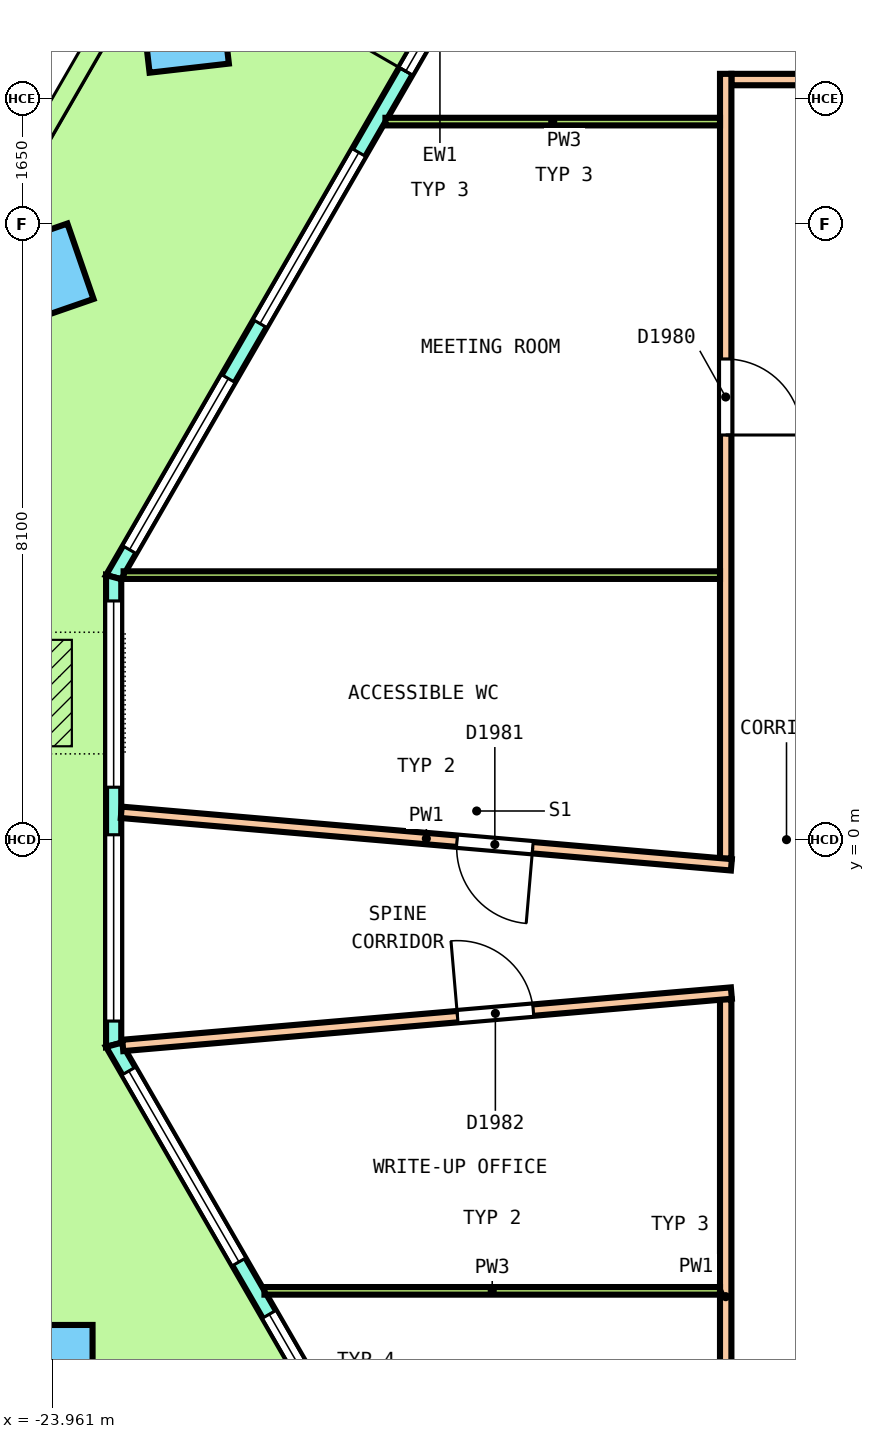
"""IFC4 building model, lengths in metres.
Left out: names, types, materials, properties, quantities, classifications, styles, units other than length and angle.
Written with IfcOpenShell. Run it as: python <this file> out.ifc"""

import sys

from ifc_helpers import new_model, si_unit, direction, frame, frame_2d, origin, origin_2d, place, context, subcontext, project, spatial, polyline, rectangle, outline, extrude, element, fill, save


model = new_model("IFC4")
c1 = context("Model", 3, precision=1e-05, world=origin(), true_north=direction((0.0, 1.0)))
c2 = subcontext(c1, "Body", "Model", "MODEL_VIEW")
j1 = project(units=[si_unit("LENGTHUNIT", "METRE"), si_unit("PLANEANGLEUNIT", "RADIAN")], contexts=[c1])
p1 = place(None, origin())
s1 = spatial("IfcSite", under=j1, at=p1, CompositionType="ELEMENT")
p2 = place(p1, origin())
s2 = spatial("IfcBuilding", under=s1, at=p2, CompositionType="ELEMENT")
p3 = place(p2, frame((0.0, 0.0, 223.4)))
s3 = spatial("IfcBuildingStorey", under=s2, at=p3, CompositionType="ELEMENT", Elevation=223.4)
p4 = place(p3, frame((-22.218, 10.672, 0.0), z_axis=(-0.025403639223, 0.018852174371, 0.999499500068), x_axis=(-0.500491739031, -0.865733791755, 0.003608458862)))
e1 = element("IfcColumn", 1, at=p4, inside=s3, PredefinedType="COLUMN", context=c2, shape_type="SweptSolid", body=[
    extrude(rectangle(XDim=1.05, YDim=1.05, at=origin_2d()), origin(), (0.0, 0.0, 1.0), 3.652),
])
p5 = place(p3, frame((-24.085, 7.438, 0.0), z_axis=(-0.021792492936, 0.025134899828, 0.999446508855), x_axis=(-0.499665392548, -0.866150076023, 0.010887667087)))
e2 = element("IfcColumn", 2, at=p5, inside=s3, PredefinedType="COLUMN", context=c2, shape_type="SweptSolid", body=[
    extrude(rectangle(XDim=1.05, YDim=1.05, at=origin_2d()), origin(), (0.0, 0.0, 1.0), 3.652),
])
p6 = place(p3, frame((-23.954, -6.91, 0.0), z_axis=(-0.010899680715, 0.018923985535, 0.999761511427), x_axis=(0.499758931252, -0.865889190801, 0.021838495538)))
e3 = element("IfcColumn", 3, at=p6, inside=s3, PredefinedType="COLUMN", context=c2, shape_type="SweptSolid", body=[
    extrude(rectangle(XDim=1.05, YDim=1.05, at=origin_2d()), origin(), (0.0, 0.0, 1.0), 3.651),
])
p7 = place(p3, frame((-14.567, 18.323, 0.0), z_axis=(0.0, 0.0, 1.0), x_axis=(-0.5000034888, -0.866023389516, 0.0)))
e4 = element("IfcWall", 4, at=p7, inside=s3, PredefinedType="SOLIDWALL", context=c2, shape_type="SweptSolid", body=[
    extrude(outline(polyline([(-0.027, -0.1), (0.986, -0.1), (2.0, -0.1), (3.013, -0.1), (4.026, -0.1), (5.039, -0.1), (6.052, -0.1), (7.065, -0.1), (8.079, -0.1), (9.092, -0.1), (10.105, -0.1), (11.118, -0.1), (12.131, -0.1), (13.145, -0.1), (14.158, -0.1), (15.171, -0.1), (16.184, -0.1), (17.197, -0.1), (17.144, 0.1), (16.137, 0.1), (15.13, 0.1), (14.123, 0.1), (13.116, 0.1), (12.109, 0.1), (11.102, 0.1), (10.095, 0.1), (9.089, 0.1), (8.082, 0.1), (7.075, 0.1), (6.068, 0.1), (5.061, 0.1), (4.054, 0.1), (3.047, 0.1), (2.041, 0.1), (1.034, 0.1), (0.027, 0.1), (-0.027, -0.1)])), origin(), (0.0, 0.0, 1.0), 3.7),
])
p8 = place(p7, frame((0.417, 0.0, 0.1)))
e5 = element("IfcOpeningElement", 5, at=p8, cuts=e4, PredefinedType="OPENING", context=c2, shape_type="SweptSolid", body=[
    extrude(rectangle(XDim=2.6, YDim=2.65, at=frame_2d((1.3, 1.325))), frame((0.0, 0.11, 0.0), z_axis=(0.0, -1.0, 0.0), x_axis=(1.0, 0.0, 0.0)), (0.0, 0.0, 1.0), 0.22),
])
p9 = place(p7, frame((3.851, 0.0, 0.1)))
e6 = element("IfcOpeningElement", 6, at=p9, cuts=e4, PredefinedType="OPENING", context=c2, shape_type="SweptSolid", body=[
    extrude(rectangle(XDim=2.6, YDim=2.65, at=frame_2d((1.3, 1.325))), frame((0.0, 0.11, 0.0), z_axis=(0.0, -1.0, 0.0), x_axis=(1.0, 0.0, 0.0)), (0.0, 0.0, 1.0), 0.22),
])
p10 = place(p7, frame((7.685, 0.0, 0.0)))
e7 = element("IfcOpeningElement", 7, at=p10, cuts=e4, PredefinedType="OPENING", context=c2, shape_type="SweptSolid", body=[
    extrude(rectangle(XDim=1.8, YDim=2.4, at=frame_2d((0.9, 1.2))), frame((0.0, 0.11, 0.0), z_axis=(0.0, -1.0, 0.0), x_axis=(1.0, 0.0, 0.0)), (0.0, 0.0, 1.0), 0.22),
])
p11 = place(p7, frame((7.685, 0.0, 2.55)))
e8 = element("IfcOpeningElement", 8, at=p11, cuts=e4, PredefinedType="OPENING", context=c2, shape_type="SweptSolid", body=[
    extrude(rectangle(XDim=1.8, YDim=0.2, at=frame_2d((0.9, 0.1))), frame((0.0, 0.11, 0.0), z_axis=(0.0, -1.0, 0.0), x_axis=(1.0, 0.0, 0.0)), (0.0, 0.0, 1.0), 0.22),
])
p12 = place(p7, frame((10.719, 0.0, 0.1)))
e9 = element("IfcOpeningElement", 9, at=p12, cuts=e4, PredefinedType="OPENING", context=c2, shape_type="SweptSolid", body=[
    extrude(rectangle(XDim=2.6, YDim=2.65, at=frame_2d((1.3, 1.325))), frame((0.0, 0.11, 0.0), z_axis=(0.0, -1.0, 0.0), x_axis=(1.0, 0.0, 0.0)), (0.0, 0.0, 1.0), 0.22),
])
p13 = place(p7, frame((14.153, 0.0, 0.1)))
e10 = element("IfcOpeningElement", 10, at=p13, cuts=e4, PredefinedType="OPENING", context=c2, shape_type="SweptSolid", body=[
    extrude(rectangle(XDim=2.6, YDim=2.65, at=frame_2d((1.3, 1.325))), frame((0.0, 0.11, 0.0), z_axis=(0.0, -1.0, 0.0), x_axis=(1.0, 0.0, 0.0)), (0.0, 0.0, 1.0), 0.22),
])
p14 = place(p3, frame((-23.152, 3.454, 0.0), z_axis=(0.0, 0.0, 1.0), x_axis=(0.0, -1.0, 0.0)))
e11 = element("IfcWall", 11, at=p14, inside=s3, PredefinedType="SOLIDWALL", context=c2, shape_type="SweptSolid", body=[
    extrude(outline(polyline([(-0.027, -0.1), (1.008, -0.1), (2.042, -0.1), (3.076, -0.1), (4.111, -0.1), (5.145, -0.1), (6.18, -0.1), (6.126, 0.1), (5.109, 0.1), (4.093, 0.1), (3.076, 0.1), (2.06, 0.1), (1.043, 0.1), (0.027, 0.1), (-0.027, -0.1)])), origin(), (0.0, 0.0, 1.0), 3.7),
])
p15 = place(p14, frame((0.313, 0.0, 0.1)))
e12 = element("IfcOpeningElement", 12, at=p15, cuts=e11, PredefinedType="OPENING", context=c2, shape_type="SweptSolid", body=[
    extrude(rectangle(XDim=2.45, YDim=2.65, at=frame_2d((1.225, 1.325))), frame((0.0, 0.11, 0.0), z_axis=(0.0, -1.0, 0.0), x_axis=(1.0, 0.0, 0.0)), (0.0, 0.0, 1.0), 0.22),
])
p16 = place(p14, frame((3.39, 0.0, 0.1)))
e13 = element("IfcOpeningElement", 13, at=p16, cuts=e11, PredefinedType="OPENING", context=c2, shape_type="SweptSolid", body=[
    extrude(rectangle(XDim=2.45, YDim=2.65, at=frame_2d((1.225, 1.325))), frame((0.0, 0.11, 0.0), z_axis=(0.0, -1.0, 0.0), x_axis=(1.0, 0.0, 0.0)), (0.0, 0.0, 1.0), 0.22),
])
p17 = place(p3, frame((-23.152, -2.699, 0.0), z_axis=(0.0, 0.0, 1.0), x_axis=(0.499993148765, -0.866029359311, 0.0)))
e14 = element("IfcWall", 14, at=p17, inside=s3, PredefinedType="SOLIDWALL", context=c2, shape_type="SweptSolid", body=[
    extrude(outline(polyline([(-0.027, -0.1), (1.003, -0.1), (2.032, -0.1), (3.062, -0.1), (4.091, -0.1), (5.121, -0.1), (6.15, -0.1), (7.179, -0.1), (8.209, -0.1), (9.238, -0.1), (10.268, -0.1), (11.297, -0.1), (12.327, -0.1), (13.356, -0.1), (14.386, -0.1), (15.415, -0.1), (16.445, -0.1), (17.474, -0.1), (18.504, -0.1), (18.45, 0.1), (17.427, 0.1), (16.403, 0.1), (15.379, 0.1), (14.356, 0.1), (13.333, 0.1), (12.309, 0.1), (11.285, 0.1), (10.262, 0.1), (9.238, 0.1), (8.215, 0.1), (7.191, 0.1), (6.168, 0.1), (5.144, 0.1), (4.121, 0.1), (3.097, 0.1), (2.074, 0.1), (1.05, 0.1), (0.027, 0.1), (-0.027, -0.1)])), origin(), (0.0, 0.0, 1.0), 3.7),
])
p18 = place(p17, frame((0.398, 0.0, 0.1)))
e15 = element("IfcOpeningElement", 15, at=p18, cuts=e14, PredefinedType="OPENING", context=c2, shape_type="SweptSolid", body=[
    extrude(rectangle(XDim=2.9, YDim=2.65, at=frame_2d((1.45, 1.325))), frame((0.0, 0.11, 0.0), z_axis=(0.0, -1.0, 0.0), x_axis=(1.0, 0.0, 0.0)), (0.0, 0.0, 1.0), 0.22),
])
p19 = place(p17, frame((4.093, 0.0, 0.1)))
e16 = element("IfcOpeningElement", 16, at=p19, cuts=e14, PredefinedType="OPENING", context=c2, shape_type="SweptSolid", body=[
    extrude(rectangle(XDim=2.9, YDim=2.65, at=frame_2d((1.45, 1.325))), frame((0.0, 0.11, 0.0), z_axis=(0.0, -1.0, 0.0), x_axis=(1.0, 0.0, 0.0)), (0.0, 0.0, 1.0), 0.22),
])
p20 = place(p17, frame((8.338, 0.0, 0.0)))
e17 = element("IfcOpeningElement", 17, at=p20, cuts=e14, PredefinedType="OPENING", context=c2, shape_type="SweptSolid", body=[
    extrude(rectangle(XDim=1.8, YDim=2.4, at=frame_2d((0.9, 1.2))), frame((0.0, 0.11, 0.0), z_axis=(0.0, -1.0, 0.0), x_axis=(1.0, 0.0, 0.0)), (0.0, 0.0, 1.0), 0.22),
])
p21 = place(p17, frame((8.338, 0.0, 2.55)))
e18 = element("IfcOpeningElement", 18, at=p21, cuts=e14, PredefinedType="OPENING", context=c2, shape_type="SweptSolid", body=[
    extrude(rectangle(XDim=1.8, YDim=0.2, at=frame_2d((0.9, 0.1))), frame((0.0, 0.11, 0.0), z_axis=(0.0, -1.0, 0.0), x_axis=(1.0, 0.0, 0.0)), (0.0, 0.0, 1.0), 0.22),
])
p22 = place(p17, frame((11.484, 0.0, 0.1)))
e19 = element("IfcOpeningElement", 19, at=p22, cuts=e14, PredefinedType="OPENING", context=c2, shape_type="SweptSolid", body=[
    extrude(rectangle(XDim=2.9, YDim=2.65, at=frame_2d((1.45, 1.325))), frame((0.0, 0.11, 0.0), z_axis=(0.0, -1.0, 0.0), x_axis=(1.0, 0.0, 0.0)), (0.0, 0.0, 1.0), 0.22),
])
p23 = place(p17, frame((15.179, 0.0, 0.1)))
e20 = element("IfcOpeningElement", 20, at=p23, cuts=e14, PredefinedType="OPENING", context=c2, shape_type="SweptSolid", body=[
    extrude(rectangle(XDim=2.9, YDim=2.65, at=frame_2d((1.45, 1.325))), frame((0.0, 0.11, 0.0), z_axis=(0.0, -1.0, 0.0), x_axis=(1.0, 0.0, 0.0)), (0.0, 0.0, 1.0), 0.22),
])
p24 = place(p3, frame((-15.025, 10.0, 0.0), z_axis=(0.0, 0.0, 1.0), x_axis=(1.0, 0.0, 0.0)))
e21 = element("IfcWall", 21, at=p24, inside=s3, PredefinedType="PARTITIONING", context=c2, shape_type="SweptSolid", body=[
    extrude(rectangle(XDim=30.075, YDim=0.15, at=frame_2d((15.038, 0.0))), origin(), (0.0, 0.0, 1.0), 2.8),
])
p25 = place(p24, frame((25.509, 0.0, 0.0)))
e22 = element("IfcOpeningElement", 22, at=p25, cuts=e21, PredefinedType="OPENING", context=c2, shape_type="SweptSolid", body=[
    extrude(rectangle(XDim=1.2, YDim=2.1, at=frame_2d((0.6, 1.05))), frame((0.0, 0.085, 0.0), z_axis=(0.0, -1.0, 0.0), x_axis=(1.0, 0.0, 0.0)), (0.0, 0.0, 1.0), 0.17),
])
p26 = place(p24, frame((14.409, 0.0, 0.0)))
e23 = element("IfcOpeningElement", 23, at=p26, cuts=e21, PredefinedType="OPENING", context=c2, shape_type="SweptSolid", body=[
    extrude(rectangle(XDim=1.0, YDim=2.1, at=frame_2d((0.5, 1.05))), frame((0.0, 0.085, 0.0), z_axis=(0.0, -1.0, 0.0), x_axis=(1.0, 0.0, 0.0)), (0.0, 0.0, 1.0), 0.17),
])
p27 = place(p24, frame((2.949, 0.0, 0.0)))
e24 = element("IfcOpeningElement", 24, at=p27, cuts=e21, PredefinedType="OPENING", context=c2, shape_type="SweptSolid", body=[
    extrude(rectangle(XDim=1.2, YDim=2.1, at=frame_2d((0.6, 1.05))), frame((0.0, 0.085, 0.0), z_axis=(0.0, -1.0, 0.0), x_axis=(1.0, 0.0, 0.0)), (0.0, 0.0, 1.0), 0.17),
])
p28 = place(p3, frame((-15.1, -9.925, 0.0), z_axis=(0.0, 0.0, 1.0), x_axis=(0.0, 1.0, 0.0)))
e25 = element("IfcWall", 25, at=p28, inside=s3, PredefinedType="PARTITIONING", context=c2, shape_type="SweptSolid", body=[
    extrude(rectangle(XDim=7.825, YDim=0.15, at=frame_2d((3.913, 0.0))), origin(), (0.0, 0.0, 1.0), 2.8),
])
p29 = place(p28, frame((0.866, 0.0, 0.0)))
e26 = element("IfcOpeningElement", 26, at=p29, cuts=e25, PredefinedType="OPENING", context=c2, shape_type="SweptSolid", body=[
    extrude(rectangle(XDim=1.0, YDim=2.1, at=frame_2d((0.5, 1.05))), frame((0.0, 0.085, 0.0), z_axis=(0.0, -1.0, 0.0), x_axis=(1.0, 0.0, 0.0)), (0.0, 0.0, 1.0), 0.17),
])
p30 = place(p3, frame((-15.1, -0.25, 0.0), z_axis=(0.0, 0.0, 1.0), x_axis=(0.0, 1.0, 0.0)))
e27 = element("IfcWall", 27, at=p30, inside=s3, PredefinedType="PARTITIONING", context=c2, shape_type="SweptSolid", body=[
    extrude(rectangle(XDim=10.324, YDim=0.15, at=frame_2d((5.162, 0.0))), origin(), (0.0, 0.0, 1.0), 2.8),
])
p31 = place(p30, frame((5.573, 0.0, 0.0)))
e28 = element("IfcOpeningElement", 28, at=p31, cuts=e27, PredefinedType="OPENING", context=c2, shape_type="SweptSolid", body=[
    extrude(rectangle(XDim=1.0, YDim=2.1, at=frame_2d((0.5, 1.05))), frame((0.0, 0.085, 0.0), z_axis=(0.0, -1.0, 0.0), x_axis=(1.0, 0.0, 0.0)), (0.0, 0.0, 1.0), 0.17),
])
p32 = place(p3, frame((-23.052, 0.36, 0.0), z_axis=(0.0, 0.0, 1.0), x_axis=(0.996318303702, -0.085731194488, 0.0)))
e29 = element("IfcWall", 29, at=p32, inside=s3, PredefinedType="PARTITIONING", context=c2, shape_type="SweptSolid", body=[
    extrude(rectangle(XDim=8.056, YDim=0.15, at=frame_2d((4.028, 0.0))), origin(), (0.0, 0.0, 1.0), 2.8),
])
p33 = place(p32, frame((4.433, 0.0, 0.0)))
e30 = element("IfcOpeningElement", 30, at=p33, cuts=e29, PredefinedType="OPENING", context=c2, shape_type="SweptSolid", body=[
    extrude(rectangle(XDim=1.0, YDim=2.1, at=frame_2d((0.5, 1.05))), frame((0.0, 0.085, 0.0), z_axis=(0.0, -1.0, 0.0), x_axis=(1.0, 0.0, 0.0)), (0.0, 0.0, 1.0), 0.17),
])
p34 = place(p3, frame((-23.032, -2.707, 0.0), z_axis=(0.0, 0.0, 1.0), x_axis=(0.99631556311, 0.085763038105, 0.0)))
e31 = element("IfcWall", 31, at=p34, inside=s3, PredefinedType="PARTITIONING", context=c2, shape_type="SweptSolid", body=[
    extrude(rectangle(XDim=8.036, YDim=0.15, at=frame_2d((4.018, 0.0))), origin(), (0.0, 0.0, 1.0), 2.8),
])
p35 = place(p34, frame((4.42, 0.0, 0.0)))
e32 = element("IfcOpeningElement", 32, at=p35, cuts=e31, PredefinedType="OPENING", context=c2, shape_type="SweptSolid", body=[
    extrude(rectangle(XDim=1.0, YDim=2.1, at=frame_2d((0.5, 1.05))), frame((0.0, 0.085, 0.0), z_axis=(0.0, -1.0, 0.0), x_axis=(1.0, 0.0, 0.0)), (0.0, 0.0, 1.0), 0.17),
])
p36 = place(p3, frame((-19.576, 9.447, 0.0), z_axis=(0.0, 0.0, 1.0), x_axis=(1.0, 0.0, 0.0)))
e33 = element("IfcWall", 33, at=p36, inside=s3, PredefinedType="PARTITIONING", context=c2, shape_type="SweptSolid", body=[
    extrude(rectangle(XDim=4.401, YDim=0.1, at=frame_2d((2.201, 0.0))), origin(), (0.0, 0.0, 1.0), 2.8),
])
p37 = place(p3, frame((-23.021, 3.48, 0.0), z_axis=(0.0, 0.0, 1.0), x_axis=(1.0, 0.0, 0.0)))
e34 = element("IfcWall", 34, at=p37, inside=s3, PredefinedType="PARTITIONING", context=c2, shape_type="SweptSolid", body=[
    extrude(rectangle(XDim=7.846, YDim=0.1, at=frame_2d((3.923, 0.0))), origin(), (0.0, 0.0, 1.0), 2.8),
])
p38 = place(p3, frame((-21.168, -5.936, 0.0), z_axis=(0.0, 0.0, 1.0), x_axis=(1.0, 0.0, 0.0)))
e35 = element("IfcWall", 35, at=p38, inside=s3, PredefinedType="PARTITIONING", context=c2, shape_type="SweptSolid", body=[
    extrude(rectangle(XDim=5.993, YDim=0.1, at=frame_2d((2.997, 0.0))), origin(), (0.0, 0.0, 1.0), 2.8),
])
p39 = place(p10, origin())
e36 = element("IfcDoor", 36, at=p39, inside=s3, OperationType="DOUBLE_DOOR_SINGLE_SWING", PredefinedType="DOOR", context=c2, shape_type="SweptSolid", body=[
    extrude(rectangle(XDim=1.8, YDim=2.4, at=frame_2d((0.9, 1.2))), frame((0.0, 0.025, 0.0), z_axis=(0.0, -1.0, 0.0), x_axis=(1.0, 0.0, 0.0)), (0.0, 0.0, 1.0), 0.05),
])
fill(e7, e36)
p40 = place(p11, origin())
e37 = element("IfcWindow", 37, at=p40, inside=s3, PartitioningType="SINGLE_PANEL", PredefinedType="WINDOW", context=c2, shape_type="SweptSolid", body=[
    extrude(rectangle(XDim=1.8, YDim=0.2, at=frame_2d((0.9, 0.1))), frame((0.0, 0.03, 0.0), z_axis=(0.0, -1.0, 0.0), x_axis=(1.0, 0.0, 0.0)), (0.0, 0.0, 1.0), 0.06),
])
fill(e8, e37)
p41 = place(p12, origin())
e38 = element("IfcWindow", 38, at=p41, inside=s3, PartitioningType="SINGLE_PANEL", PredefinedType="WINDOW", context=c2, shape_type="SweptSolid", body=[
    extrude(rectangle(XDim=2.6, YDim=2.65, at=frame_2d((1.3, 1.325))), frame((0.0, 0.03, 0.0), z_axis=(0.0, -1.0, 0.0), x_axis=(1.0, 0.0, 0.0)), (0.0, 0.0, 1.0), 0.06),
])
fill(e9, e38)
p42 = place(p13, origin())
e39 = element("IfcWindow", 39, at=p42, inside=s3, PartitioningType="SINGLE_PANEL", PredefinedType="WINDOW", context=c2, shape_type="SweptSolid", body=[
    extrude(rectangle(XDim=2.6, YDim=2.65, at=frame_2d((1.3, 1.325))), frame((0.0, 0.03, 0.0), z_axis=(0.0, -1.0, 0.0), x_axis=(1.0, 0.0, 0.0)), (0.0, 0.0, 1.0), 0.06),
])
fill(e10, e39)
p43 = place(p15, origin())
e40 = element("IfcWindow", 40, at=p43, inside=s3, PartitioningType="SINGLE_PANEL", PredefinedType="WINDOW", context=c2, shape_type="SweptSolid", body=[
    extrude(rectangle(XDim=2.45, YDim=2.65, at=frame_2d((1.225, 1.325))), frame((0.0, 0.03, 0.0), z_axis=(0.0, -1.0, 0.0), x_axis=(1.0, 0.0, 0.0)), (0.0, 0.0, 1.0), 0.06),
])
fill(e12, e40)
p44 = place(p16, origin())
e41 = element("IfcWindow", 41, at=p44, inside=s3, PartitioningType="SINGLE_PANEL", PredefinedType="WINDOW", context=c2, shape_type="SweptSolid", body=[
    extrude(rectangle(XDim=2.45, YDim=2.65, at=frame_2d((1.225, 1.325))), frame((0.0, 0.03, 0.0), z_axis=(0.0, -1.0, 0.0), x_axis=(1.0, 0.0, 0.0)), (0.0, 0.0, 1.0), 0.06),
])
fill(e13, e41)
p45 = place(p18, origin())
e42 = element("IfcWindow", 42, at=p45, inside=s3, PartitioningType="SINGLE_PANEL", PredefinedType="WINDOW", context=c2, shape_type="SweptSolid", body=[
    extrude(rectangle(XDim=2.9, YDim=2.65, at=frame_2d((1.45, 1.325))), frame((0.0, 0.03, 0.0), z_axis=(0.0, -1.0, 0.0), x_axis=(1.0, 0.0, 0.0)), (0.0, 0.0, 1.0), 0.06),
])
fill(e15, e42)
p46 = place(p19, origin())
e43 = element("IfcWindow", 43, at=p46, inside=s3, PartitioningType="SINGLE_PANEL", PredefinedType="WINDOW", context=c2, shape_type="SweptSolid", body=[
    extrude(rectangle(XDim=2.9, YDim=2.65, at=frame_2d((1.45, 1.325))), frame((0.0, 0.03, 0.0), z_axis=(0.0, -1.0, 0.0), x_axis=(1.0, 0.0, 0.0)), (0.0, 0.0, 1.0), 0.06),
])
fill(e16, e43)
p47 = place(p31, origin())
e44 = element("IfcDoor", 44, at=p47, inside=s3, OperationType="SINGLE_SWING_RIGHT", PredefinedType="DOOR", context=c2, shape_type="SweptSolid", body=[
    extrude(rectangle(XDim=1.0, YDim=2.1, at=frame_2d((0.5, 1.05))), frame((0.0, 0.025, 0.0), z_axis=(0.0, -1.0, 0.0), x_axis=(1.0, 0.0, 0.0)), (0.0, 0.0, 1.0), 0.05),
])
fill(e28, e44)
p48 = place(p33, origin())
e45 = element("IfcDoor", 45, at=p48, inside=s3, OperationType="SINGLE_SWING_RIGHT", PredefinedType="DOOR", context=c2, shape_type="SweptSolid", body=[
    extrude(rectangle(XDim=1.0, YDim=2.1, at=frame_2d((0.5, 1.05))), frame((0.0, 0.025, 0.0), z_axis=(0.0, -1.0, 0.0), x_axis=(1.0, 0.0, 0.0)), (0.0, 0.0, 1.0), 0.05),
])
fill(e30, e45)
p49 = place(p35, origin())
e46 = element("IfcDoor", 46, at=p49, inside=s3, OperationType="SINGLE_SWING_RIGHT", PredefinedType="DOOR", context=c2, shape_type="SweptSolid", body=[
    extrude(rectangle(XDim=1.0, YDim=2.1, at=frame_2d((0.5, 1.05))), frame((0.0, 0.025, 0.0), z_axis=(0.0, -1.0, 0.0), x_axis=(1.0, 0.0, 0.0)), (0.0, 0.0, 1.0), 0.05),
])
fill(e32, e46)
save(model, sys.argv[1])
